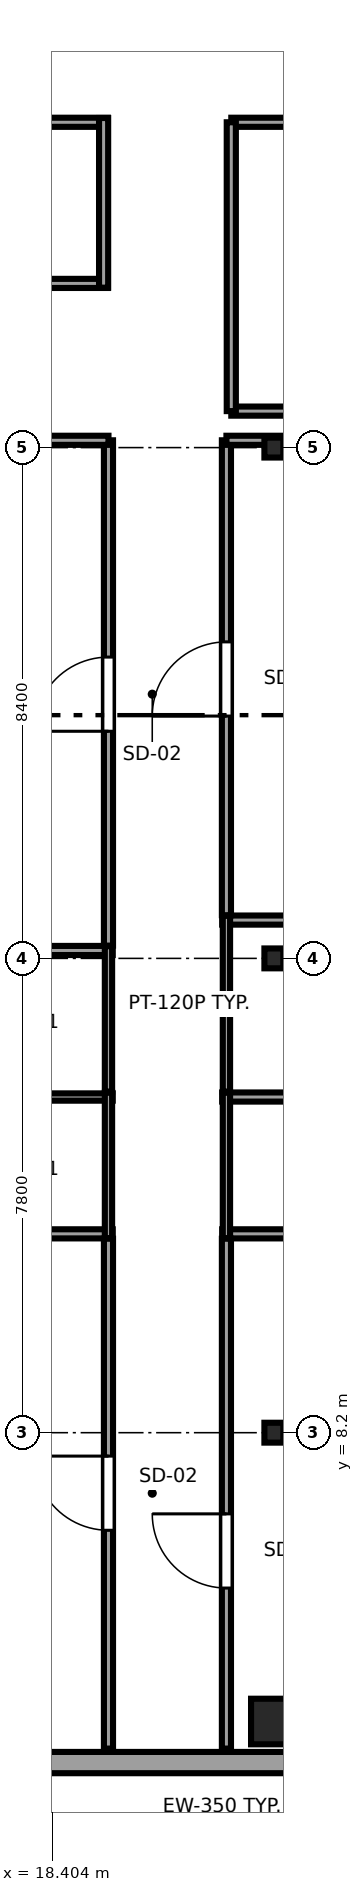
"""IFC4 building model, lengths in metres.
Left out: names, types, materials, properties, quantities, classifications, styles, units other than length and angle.
Written with IfcOpenShell. Run it as: python <this file> out.ifc"""

import sys

from ifc_helpers import new_model, si_unit, direction, frame, frame_2d, origin, origin_2d, place, context, subcontext, project, spatial, rectangle, i_section, extrude, source, transform, mapped, element, fill, save


model = new_model("IFC4")
c1 = context("Model", 3, precision=1e-05, world=origin(), true_north=direction((0.0, 1.0)))
c2 = subcontext(c1, "Body", "Model", "MODEL_VIEW")
j1 = project(units=[si_unit("LENGTHUNIT", "METRE"), si_unit("PLANEANGLEUNIT", "RADIAN")], contexts=[c1])
p1 = place(None, origin())
s1 = spatial("IfcSite", under=j1, at=p1, CompositionType="ELEMENT")
p2 = place(p1, origin())
s2 = spatial("IfcBuilding", under=s1, at=p2, CompositionType="ELEMENT")
p3 = place(p2, frame((0.0, 0.0, 227.45)))
s3 = spatial("IfcBuildingStorey", under=s2, at=p3, CompositionType="ELEMENT", Elevation=227.45)
m1 = source(origin(), c2, "Body", "SweptSolid", [
    extrude(rectangle(XDim=0.75, YDim=0.75, at=origin_2d()), origin(), (0.0, 0.0, 1.0), 3.55),
])
p4 = place(p3, frame((22.05, 3.45, 0.0), z_axis=(0.0, 0.0, 1.0), x_axis=(1.0, 0.0, 0.0)))
e1 = element("IfcColumn", 1, at=p4, inside=s3, PredefinedType="COLUMN", context=c2, shape_type="MappedRepresentation", body=[
    mapped(m1, transform((0.0, 0.0, 0.0), x_axis=(1.0, 0.0, 0.0), y_axis=(0.0, 1.0, 0.0), z_axis=(0.0, 0.0, 1.0), scale=1.0)),
])
m2 = source(origin(), c2, "Body", "SweptSolid", [
    extrude(i_section(OverallWidth=0.311, OverallDepth=0.327, WebThickness=0.016, FlangeThickness=0.025, FilletRadius=0.017, at=origin_2d()), origin(), (0.0, 0.0, 1.0), 3.55),
])
for number, where, z_axis, x_axis in (
    (2, (22.05, 8.2, 0.0), (0.0, 0.0, 1.0), (1.0, 0.0, 0.0)),
    (3, (22.05, 16.0, 0.0), (0.0, 0.0, 1.0), (1.0, 0.0, 0.0)),
    (4, (22.05, 24.4, 0.0), (0.0, 0.0, 1.0), (1.0, 0.0, 0.0)),
):
    element("IfcColumn", number, at=place(p3, frame(where, z_axis=z_axis, x_axis=x_axis)), inside=s3, PredefinedType="COLUMN", context=c2, shape_type="MappedRepresentation", body=[
        mapped(m2, transform((0.0, 0.0, 0.0), x_axis=(1.0, 0.0, 0.0), y_axis=(0.0, 1.0, 0.0), z_axis=(0.0, 0.0, 1.0), scale=1.0)),
    ])
p5 = place(p3, frame((7.017, 2.775, 0.0), z_axis=(0.0, 0.0, 1.0), x_axis=(1.0, 0.0, 0.0)))
e5 = element("IfcWall", 5, at=p5, inside=s3, PredefinedType="SOLIDWALL", context=c2, shape_type="SweptSolid", body=[
    extrude(rectangle(XDim=28.366, YDim=0.35, at=frame_2d((14.183, 0.0))), origin(), (0.0, 0.0, 1.0), 3.37),
])
p6 = place(p5, frame((1.514, 0.0, 0.68)))
e6 = element("IfcOpeningElement", 6, at=p6, cuts=e5, PredefinedType="OPENING", context=c2, shape_type="SweptSolid", body=[
    extrude(rectangle(XDim=2.7, YDim=1.95, at=frame_2d((1.35, 0.975))), frame((0.0, 0.185, 0.0), z_axis=(0.0, -1.0, 0.0), x_axis=(1.0, 0.0, 0.0)), (0.0, 0.0, 1.0), 0.37),
])
p7 = place(p5, frame((15.647, 0.0, 0.68)))
e7 = element("IfcOpeningElement", 7, at=p7, cuts=e5, PredefinedType="OPENING", context=c2, shape_type="SweptSolid", body=[
    extrude(rectangle(XDim=2.7, YDim=1.95, at=frame_2d((1.35, 0.975))), frame((0.0, 0.185, 0.0), z_axis=(0.0, -1.0, 0.0), x_axis=(1.0, 0.0, 0.0)), (0.0, 0.0, 1.0), 0.37),
])
p8 = place(p5, frame((24.152, 0.0, 0.68)))
e8 = element("IfcOpeningElement", 8, at=p8, cuts=e5, PredefinedType="OPENING", context=c2, shape_type="SweptSolid", body=[
    extrude(rectangle(XDim=2.7, YDim=1.95, at=frame_2d((1.35, 0.975))), frame((0.0, 0.185, 0.0), z_axis=(0.0, -1.0, 0.0), x_axis=(1.0, 0.0, 0.0)), (0.0, 0.0, 1.0), 0.37),
])
p9 = place(p3, frame((16.81, 11.47, 0.0), z_axis=(0.0, 0.0, 1.0), x_axis=(1.0, 0.0, 0.0)))
e9 = element("IfcWall", 9, at=p9, inside=s3, PredefinedType="PARTITIONING", context=c2, shape_type="SweptSolid", body=[
    extrude(rectangle(XDim=2.59, YDim=0.15, at=frame_2d((1.295, 0.0))), origin(), (0.0, 0.0, 1.0), 3.37),
])
p10 = place(p3, frame((16.81, 13.72, 0.0), z_axis=(0.0, 0.0, 1.0), x_axis=(1.0, 0.0, 0.0)))
e10 = element("IfcWall", 10, at=p10, inside=s3, PredefinedType="PLUMBINGWALL", context=c2, shape_type="SweptSolid", body=[
    extrude(rectangle(XDim=2.59, YDim=0.12, at=frame_2d((1.295, 0.0))), origin(), (0.0, 0.0, 1.0), 3.37),
])
p11 = place(p3, frame((19.33, 11.4, 0.0), z_axis=(0.0, 0.0, 1.0), x_axis=(0.0, 1.0, 0.0)))
e11 = element("IfcWall", 11, at=p11, inside=s3, PredefinedType="PLUMBINGWALL", context=c2, shape_type="SweptSolid", body=[
    extrude(rectangle(XDim=2.39, YDim=0.12, at=frame_2d((1.195, 0.0))), origin(), (0.0, 0.0, 1.0), 3.37),
])
p12 = place(p3, frame((16.81, 16.13, 0.0), z_axis=(0.0, 0.0, 1.0), x_axis=(1.0, 0.0, 0.0)))
e12 = element("IfcWall", 12, at=p12, inside=s3, PredefinedType="PARTITIONING", context=c2, shape_type="SweptSolid", body=[
    extrude(rectangle(XDim=2.59, YDim=0.15, at=frame_2d((1.295, 0.0))), origin(), (0.0, 0.0, 1.0), 2.758),
])
p13 = place(p3, frame((19.33, 13.81, 0.0), z_axis=(0.0, 0.0, 1.0), x_axis=(0.0, 1.0, 0.0)))
e13 = element("IfcWall", 13, at=p13, inside=s3, PredefinedType="PLUMBINGWALL", context=c2, shape_type="SweptSolid", body=[
    extrude(rectangle(XDim=2.39, YDim=0.12, at=frame_2d((1.195, 0.0))), origin(), (0.0, 0.0, 1.0), 3.37),
])
p14 = place(p3, frame((21.2, 11.47, 0.0), z_axis=(0.0, 0.0, 1.0), x_axis=(1.0, 0.0, 0.0)))
e14 = element("IfcWall", 14, at=p14, inside=s3, PredefinedType="PARTITIONING", context=c2, shape_type="SweptSolid", body=[
    extrude(rectangle(XDim=2.59, YDim=0.15, at=frame_2d((1.295, 0.0))), origin(), (0.0, 0.0, 1.0), 3.37),
])
p15 = place(p3, frame((21.2, 13.72, 0.0), z_axis=(0.0, 0.0, 1.0), x_axis=(1.0, 0.0, 0.0)))
e15 = element("IfcWall", 15, at=p15, inside=s3, PredefinedType="PARTITIONING", context=c2, shape_type="SweptSolid", body=[
    extrude(rectangle(XDim=18.195, YDim=0.15, at=frame_2d((9.098, 0.0))), origin(), (0.0, 0.0, 1.0), 3.37),
])
p16 = place(p3, frame((21.27, 11.4, 0.0), z_axis=(0.0, 0.0, 1.0), x_axis=(0.0, 1.0, 0.0)))
e16 = element("IfcWall", 16, at=p16, inside=s3, PredefinedType="PLUMBINGWALL", context=c2, shape_type="SweptSolid", body=[
    extrude(rectangle(XDim=2.39, YDim=0.12, at=frame_2d((1.195, 0.0))), origin(), (0.0, 0.0, 1.0), 3.37),
])
p17 = place(p3, frame((21.2, 16.63, 0.0), z_axis=(0.0, 0.0, 1.0), x_axis=(1.0, 0.0, 0.0)))
e17 = element("IfcWall", 17, at=p17, inside=s3, PredefinedType="PARTITIONING", context=c2, shape_type="SweptSolid", body=[
    extrude(rectangle(XDim=3.74, YDim=0.15, at=frame_2d((1.87, 0.0))), origin(), (0.0, 0.0, 1.0), 3.37),
])
p18 = place(p3, frame((21.27, 13.81, 0.0), z_axis=(0.0, 0.0, 1.0), x_axis=(0.0, 1.0, 0.0)))
e18 = element("IfcWall", 18, at=p18, inside=s3, PredefinedType="PLUMBINGWALL", context=c2, shape_type="SweptSolid", body=[
    extrude(rectangle(XDim=2.89, YDim=0.12, at=frame_2d((1.445, 0.0))), origin(), (0.0, 0.0, 1.0), 3.37),
])
p19 = place(p3, frame((19.33, 3.005, 0.0), z_axis=(0.0, 0.0, 1.0), x_axis=(0.0, 1.0, 0.0)))
e19 = element("IfcWall", 19, at=p19, inside=s3, PredefinedType="PARTITIONING", context=c2, shape_type="SweptSolid", body=[
    extrude(rectangle(XDim=8.385, YDim=0.15, at=frame_2d((4.192, 0.0))), origin(), (0.0, 0.0, 1.0), 3.37),
])
p20 = place(p19, frame((3.59, 0.0, 0.0)))
e20 = element("IfcOpeningElement", 20, at=p20, cuts=e19, PredefinedType="OPENING", context=c2, shape_type="SweptSolid", body=[
    extrude(rectangle(XDim=1.22, YDim=2.08, at=frame_2d((0.61, 1.04))), frame((0.0, 0.085, 0.0), z_axis=(0.0, -1.0, 0.0), x_axis=(1.0, 0.0, 0.0)), (0.0, 0.0, 1.0), 0.17),
])
p21 = place(p3, frame((19.33, 16.21, 0.0), z_axis=(0.0, 0.0, 1.0), x_axis=(0.0, 1.0, 0.0)))
e21 = element("IfcWall", 21, at=p21, inside=s3, PredefinedType="PARTITIONING", context=c2, shape_type="SweptSolid", body=[
    extrude(rectangle(XDim=8.31, YDim=0.15, at=frame_2d((4.155, 0.0))), origin(), (0.0, 0.0, 1.0), 3.37),
])
p22 = place(p21, frame((3.525, 0.0, 0.0)))
e22 = element("IfcOpeningElement", 22, at=p22, cuts=e21, PredefinedType="OPENING", context=c2, shape_type="SweptSolid", body=[
    extrude(rectangle(XDim=1.22, YDim=2.08, at=frame_2d((0.61, 1.04))), frame((0.0, 0.085, 0.0), z_axis=(0.0, -1.0, 0.0), x_axis=(1.0, 0.0, 0.0)), (0.0, 0.0, 1.0), 0.17),
])
p23 = place(p3, frame((2.9, 24.52, 0.0), z_axis=(0.0, 0.0, 1.0), x_axis=(1.0, 0.0, 0.0)))
e23 = element("IfcWall", 23, at=p23, inside=s3, PredefinedType="PARTITIONING", context=c2, shape_type="SweptSolid", body=[
    extrude(rectangle(XDim=16.43, YDim=0.15, at=frame_2d((8.215, 0.0))), origin(), (0.0, 0.0, 1.0), 2.758),
])
p24 = place(p3, frame((21.27, 3.005, 0.0), z_axis=(0.0, 0.0, 1.0), x_axis=(0.0, 1.0, 0.0)))
e24 = element("IfcWall", 24, at=p24, inside=s3, PredefinedType="PARTITIONING", context=c2, shape_type="SweptSolid", body=[
    extrude(rectangle(XDim=8.385, YDim=0.15, at=frame_2d((4.192, 0.0))), origin(), (0.0, 0.0, 1.0), 3.37),
])
p25 = place(p24, frame((2.64, 0.0, 0.0)))
e25 = element("IfcOpeningElement", 25, at=p25, cuts=e24, PredefinedType="OPENING", context=c2, shape_type="SweptSolid", body=[
    extrude(rectangle(XDim=1.22, YDim=2.08, at=frame_2d((0.61, 1.04))), frame((0.0, 0.085, 0.0), z_axis=(0.0, -1.0, 0.0), x_axis=(1.0, 0.0, 0.0)), (0.0, 0.0, 1.0), 0.17),
])
p26 = place(p3, frame((21.27, 16.71, 0.0), z_axis=(0.0, 0.0, 1.0), x_axis=(0.0, 1.0, 0.0)))
e26 = element("IfcWall", 26, at=p26, inside=s3, PredefinedType="PARTITIONING", context=c2, shape_type="SweptSolid", body=[
    extrude(rectangle(XDim=7.81, YDim=0.15, at=frame_2d((3.905, 0.0))), origin(), (0.0, 0.0, 1.0), 3.37),
])
p27 = place(p26, frame((3.275, 0.0, 0.0)))
e27 = element("IfcOpeningElement", 27, at=p27, cuts=e26, PredefinedType="OPENING", context=c2, shape_type="SweptSolid", body=[
    extrude(rectangle(XDim=1.22, YDim=2.08, at=frame_2d((0.61, 1.04))), frame((0.0, 0.085, 0.0), z_axis=(0.0, -1.0, 0.0), x_axis=(1.0, 0.0, 0.0)), (0.0, 0.0, 1.0), 0.17),
])
p28 = place(p3, frame((21.27, 24.52, 0.0), z_axis=(0.0, 0.0, 1.0), x_axis=(1.0, 0.0, 0.0)))
e28 = element("IfcWall", 28, at=p28, inside=s3, PredefinedType="PARTITIONING", context=c2, shape_type="SweptSolid", body=[
    extrude(rectangle(XDim=18.125, YDim=0.15, at=frame_2d((9.062, 0.0))), origin(), (0.0, 0.0, 1.0), 2.758),
])
p29 = place(p3, frame((9.93, 27.1, 0.0), z_axis=(0.0, 0.0, 1.0), x_axis=(1.0, 0.0, 0.0)))
e29 = element("IfcWall", 29, at=p29, inside=s3, PredefinedType="PARTITIONING", context=c2, shape_type="SweptSolid", body=[
    extrude(rectangle(XDim=9.39, YDim=0.15, at=frame_2d((4.695, 0.0))), origin(), (0.0, 0.0, 1.0), 3.37),
])
p30 = place(p3, frame((9.93, 29.75, 0.0), z_axis=(0.0, 0.0, 1.0), x_axis=(1.0, 0.0, 0.0)))
e30 = element("IfcWall", 30, at=p30, inside=s3, PredefinedType="PARTITIONING", context=c2, shape_type="SweptSolid", body=[
    extrude(rectangle(XDim=9.39, YDim=0.15, at=frame_2d((4.695, 0.0))), origin(), (0.0, 0.0, 1.0), 3.37),
])
p31 = place(p30, frame((4.235, 0.0, 0.0)))
e31 = element("IfcOpeningElement", 31, at=p31, cuts=e30, PredefinedType="OPENING", context=c2, shape_type="SweptSolid", body=[
    extrude(rectangle(XDim=0.92, YDim=2.01, at=frame_2d((0.46, 1.005))), frame((0.0, 0.085, 0.0), z_axis=(0.0, -1.0, 0.0), x_axis=(1.0, 0.0, 0.0)), (0.0, 0.0, 1.0), 0.17),
])
p32 = place(p3, frame((19.25, 27.03, 0.0), z_axis=(0.0, 0.0, 1.0), x_axis=(0.0, 1.0, 0.0)))
e32 = element("IfcWall", 32, at=p32, inside=s3, PredefinedType="PARTITIONING", context=c2, shape_type="SweptSolid", body=[
    extrude(rectangle(XDim=2.79, YDim=0.15, at=frame_2d((1.395, 0.0))), origin(), (0.0, 0.0, 1.0), 3.37),
])
p33 = place(p3, frame((21.35, 25.0, 0.0), z_axis=(0.0, 0.0, 1.0), x_axis=(1.0, 0.0, 0.0)))
e33 = element("IfcWall", 33, at=p33, inside=s3, PredefinedType="PARTITIONING", context=c2, shape_type="SweptSolid", body=[
    extrude(rectangle(XDim=14.45, YDim=0.15, at=frame_2d((7.225, 0.0))), origin(), (0.0, 0.0, 1.0), 3.37),
])
p34 = place(p3, frame((21.35, 29.75, 0.0), z_axis=(0.0, 0.0, 1.0), x_axis=(1.0, 0.0, 0.0)))
e34 = element("IfcWall", 34, at=p34, inside=s3, PredefinedType="PARTITIONING", context=c2, shape_type="SweptSolid", body=[
    extrude(rectangle(XDim=14.45, YDim=0.15, at=frame_2d((7.225, 0.0))), origin(), (0.0, 0.0, 1.0), 3.37),
])
p35 = place(p34, frame((6.4, 0.0, 0.0)))
e35 = element("IfcOpeningElement", 35, at=p35, cuts=e34, PredefinedType="OPENING", context=c2, shape_type="SweptSolid", body=[
    extrude(rectangle(XDim=1.65, YDim=2.15, at=frame_2d((0.825, 1.075))), frame((0.0, 0.085, 0.0), z_axis=(0.0, -1.0, 0.0), x_axis=(1.0, 0.0, 0.0)), (0.0, 0.0, 1.0), 0.17),
])
p36 = place(p3, frame((21.35, 25.0, 0.0), z_axis=(0.0, 0.0, 1.0), x_axis=(0.0, 1.0, 0.0)))
e36 = element("IfcWall", 36, at=p36, inside=s3, PredefinedType="PARTITIONING", context=c2, shape_type="SweptSolid", body=[
    extrude(rectangle(XDim=4.75, YDim=0.15, at=frame_2d((2.375, 0.0))), origin(), (0.0, 0.0, 1.0), 3.37),
])
m3 = source(origin(), c2, "Body", "SweptSolid", [
    extrude(rectangle(XDim=1.22, YDim=2.08, at=frame_2d((0.61, 1.04))), frame((0.0, 0.025, 0.0), z_axis=(0.0, -1.0, 0.0), x_axis=(1.0, 0.0, 0.0)), (0.0, 0.0, 1.0), 0.05),
])
p37 = place(p20, origin())
e37 = element("IfcDoor", 37, at=p37, inside=s3, OperationType="SINGLE_SWING_RIGHT", PredefinedType="DOOR", context=c2, shape_type="MappedRepresentation", body=[
    mapped(m3, transform((0.0, 0.0, 0.0), x_axis=(1.0, 0.0, 0.0), y_axis=(0.0, 1.0, 0.0), z_axis=(0.0, 0.0, 1.0), scale=1.0)),
])
fill(e20, e37)
p38 = place(p22, origin())
e38 = element("IfcDoor", 38, at=p38, inside=s3, OperationType="SINGLE_SWING_LEFT", PredefinedType="DOOR", context=c2, shape_type="MappedRepresentation", body=[
    mapped(m3, transform((0.0, 0.0, 0.0), x_axis=(1.0, 0.0, 0.0), y_axis=(0.0, 1.0, 0.0), z_axis=(0.0, 0.0, 1.0), scale=1.0)),
])
fill(e22, e38)
p39 = place(p25, origin())
e39 = element("IfcDoor", 39, at=p39, inside=s3, OperationType="SINGLE_SWING_RIGHT", PredefinedType="DOOR", context=c2, shape_type="MappedRepresentation", body=[
    mapped(m3, transform((0.0, 0.0, 0.0), x_axis=(1.0, 0.0, 0.0), y_axis=(0.0, 1.0, 0.0), z_axis=(0.0, 0.0, 1.0), scale=1.0)),
])
fill(e25, e39)
p40 = place(p27, origin())
e40 = element("IfcDoor", 40, at=p40, inside=s3, OperationType="SINGLE_SWING_LEFT", PredefinedType="DOOR", context=c2, shape_type="MappedRepresentation", body=[
    mapped(m3, transform((0.0, 0.0, 0.0), x_axis=(1.0, 0.0, 0.0), y_axis=(0.0, 1.0, 0.0), z_axis=(0.0, 0.0, 1.0), scale=1.0)),
])
fill(e27, e40)
save(model, sys.argv[1])
